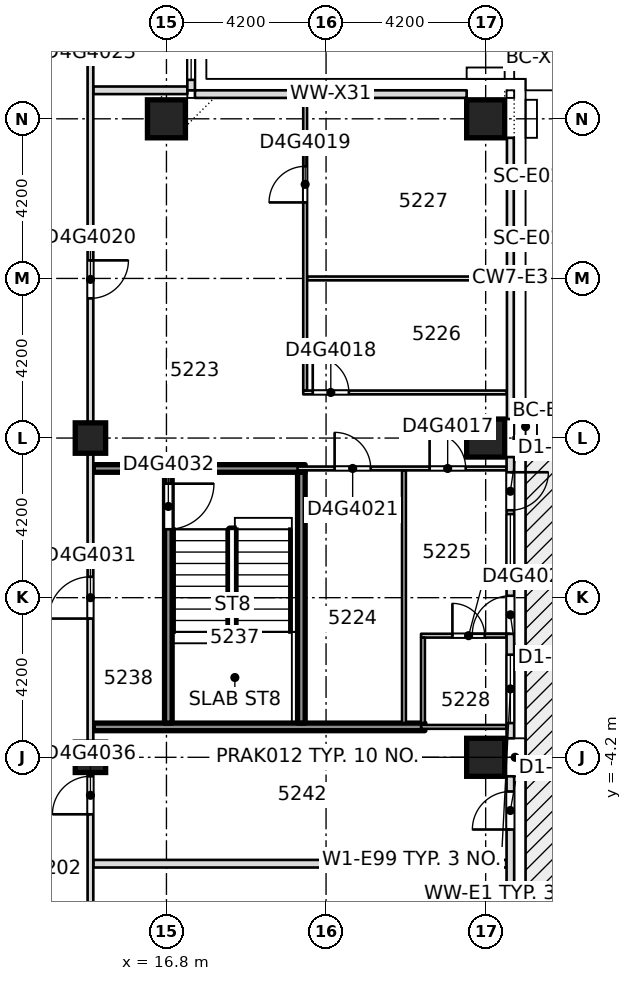
"""IFC4 building model, lengths in metres.
Left out: names, types, materials, properties, quantities, classifications, styles, units other than length and angle.
Written with IfcOpenShell. Run it as: python <this file> out.ifc"""

import sys

from ifc_helpers import new_model, si_unit, direction, frame, frame_2d, origin, origin_2d, place, context, subcontext, project, spatial, rectangle, extrude, element, fill, save


model = new_model("IFC4")
c1 = context("Model", 3, precision=1e-05, world=origin(), true_north=direction((0.0, 1.0)))
c2 = subcontext(c1, "Body", "Model", "MODEL_VIEW")
j1 = project(units=[si_unit("LENGTHUNIT", "METRE"), si_unit("PLANEANGLEUNIT", "RADIAN")], contexts=[c1])
p1 = place(None, origin())
s1 = spatial("IfcSite", under=j1, at=p1, CompositionType="ELEMENT")
p2 = place(p1, origin())
s2 = spatial("IfcBuilding", under=s1, at=p2, CompositionType="ELEMENT")
p3 = place(p2, frame((0.0, 0.0, 199.7)))
s3 = spatial("IfcBuildingStorey", under=s2, at=p3, CompositionType="ELEMENT", Elevation=199.7)
for number, where, z_axis, x_axis in (
    (1, (25.2, -4.2, -0.4), (0.0, 0.0, 1.0), (1.0, 0.0, 0.0)),
    (2, (25.2, 4.2, -0.4), (0.0, 0.0, 1.0), (1.0, 0.0, 0.0)),
    (3, (16.8, 12.6, -0.4), (0.0, 0.0, 1.0), (1.0, 0.0, 0.0)),
    (4, (25.2, 12.6, -0.4), (0.0, 0.0, 1.0), (1.0, 0.0, 0.0)),
):
    element("IfcColumn", number, at=place(p3, frame(where, z_axis=z_axis, x_axis=x_axis)), inside=s3, PredefinedType="COLUMN", context=c2, shape_type="SweptSolid", body=[
        extrude(rectangle(XDim=1.0, YDim=1.0, at=origin_2d()), origin(), (0.0, 0.0, 1.0), 3.45),
    ])
for number, where, z_axis, x_axis in (
    (5, (14.8, -4.2, -0.4), (0.0, 0.0, 1.0), (1.0, 0.0, 0.0)),
    (6, (14.8, 4.2, -0.4), (0.0, 0.0, 1.0), (1.0, 0.0, 0.0)),
):
    element("IfcColumn", number, at=place(p3, frame(where, z_axis=z_axis, x_axis=x_axis)), inside=s3, PredefinedType="COLUMN", context=c2, shape_type="SweptSolid", body=[
        extrude(rectangle(XDim=0.8, YDim=0.8, at=origin_2d()), origin(), (0.0, 0.0, 1.0), 3.45),
    ])
p4 = place(p3, frame((14.875, -7.0, 0.0), z_axis=(0.0, 0.0, 1.0), x_axis=(1.0, 0.0, 0.0)))
e7 = element("IfcWall", 7, at=p4, inside=s3, PredefinedType="PARTITIONING", context=c2, shape_type="SweptSolid", body=[
    extrude(rectangle(XDim=10.875, YDim=0.2, at=frame_2d((5.438, 0.0))), origin(), (0.0, 0.0, 1.0), 3.05),
])
p5 = place(p3, frame((14.875, -3.4, 0.0), z_axis=(0.0, 0.0, 1.0), x_axis=(1.0, 0.0, 0.0)))
e8 = element("IfcWall", 8, at=p5, inside=s3, PredefinedType="SOLIDWALL", context=c2, shape_type="SweptSolid", body=[
    extrude(rectangle(XDim=8.725, YDim=0.2, at=frame_2d((4.363, 0.0))), origin(), (0.0, 0.0, 1.0), 3.05),
])
p6 = place(p3, frame((23.5, -3.4, 0.0), z_axis=(0.0, 0.0, 1.0), x_axis=(1.0, 0.0, 0.0)))
e9 = element("IfcWall", 9, at=p6, inside=s3, PredefinedType="PARTITIONING", context=c2, shape_type="SweptSolid", body=[
    extrude(rectangle(XDim=2.25, YDim=0.1, at=frame_2d((1.125, 0.0))), origin(), (0.0, 0.0, 1.0), 3.05),
])
p7 = place(p3, frame((23.5, -1.0, 0.0), z_axis=(0.0, 0.0, 1.0), x_axis=(1.0, 0.0, 0.0)))
e10 = element("IfcWall", 10, at=p7, inside=s3, PredefinedType="PARTITIONING", context=c2, shape_type="SweptSolid", body=[
    extrude(rectangle(XDim=2.25, YDim=0.1, at=frame_2d((1.125, 0.0))), origin(), (0.0, 0.0, 1.0), 3.05),
])
p8 = place(p7, frame((0.825, 0.0, 0.0)))
e11 = element("IfcOpeningElement", 11, at=p8, cuts=e10, PredefinedType="OPENING", context=c2, shape_type="SweptSolid", body=[
    extrude(rectangle(XDim=0.85, YDim=2.1, at=frame_2d((0.425, 1.05))), frame((0.0, 0.06, 0.0), z_axis=(0.0, -1.0, 0.0), x_axis=(1.0, 0.0, 0.0)), (0.0, 0.0, 1.0), 0.12),
])
p9 = place(p3, frame((14.875, 3.4, 0.0), z_axis=(0.0, 0.0, 1.0), x_axis=(1.0, 0.0, 0.0)))
e12 = element("IfcWall", 12, at=p9, inside=s3, PredefinedType="SOLIDWALL", context=c2, shape_type="SweptSolid", body=[
    extrude(rectangle(XDim=5.575, YDim=0.2, at=frame_2d((2.788, 0.0))), origin(), (0.0, 0.0, 1.0), 3.05),
])
p10 = place(p3, frame((20.25, 3.4, 0.0), z_axis=(0.0, 0.0, 1.0), x_axis=(1.0, 0.0, 0.0)))
e13 = element("IfcWall", 13, at=p10, inside=s3, PredefinedType="PARTITIONING", context=c2, shape_type="SweptSolid", body=[
    extrude(rectangle(XDim=5.5, YDim=0.1, at=frame_2d((2.75, 0.0))), origin(), (0.0, 0.0, 1.0), 3.05),
])
p11 = place(p10, frame((3.475, 0.0, 0.0)))
e14 = element("IfcOpeningElement", 14, at=p11, cuts=e13, PredefinedType="OPENING", context=c2, shape_type="SweptSolid", body=[
    extrude(rectangle(XDim=0.95, YDim=2.1, at=frame_2d((0.475, 1.05))), frame((0.0, 0.06, 0.0), z_axis=(0.0, -1.0, 0.0), x_axis=(1.0, 0.0, 0.0)), (0.0, 0.0, 1.0), 0.12),
])
p12 = place(p10, frame((0.975, 0.0, 0.0)))
e15 = element("IfcOpeningElement", 15, at=p12, cuts=e13, PredefinedType="OPENING", context=c2, shape_type="SweptSolid", body=[
    extrude(rectangle(XDim=0.95, YDim=2.1, at=frame_2d((0.475, 1.05))), frame((0.0, 0.06, 0.0), z_axis=(0.0, -1.0, 0.0), x_axis=(1.0, 0.0, 0.0)), (0.0, 0.0, 1.0), 0.12),
])
p13 = place(p3, frame((20.4, 5.4, 0.0), z_axis=(0.0, 0.0, 1.0), x_axis=(1.0, 0.0, 0.0)))
e16 = element("IfcWall", 16, at=p13, inside=s3, PredefinedType="PARTITIONING", context=c2, shape_type="SweptSolid", body=[
    extrude(rectangle(XDim=5.35, YDim=0.1, at=frame_2d((2.675, 0.0))), origin(), (0.0, 0.0, 1.0), 3.05),
])
p14 = place(p13, frame((0.25, 0.0, 0.0)))
e17 = element("IfcOpeningElement", 17, at=p14, cuts=e16, PredefinedType="OPENING", context=c2, shape_type="SweptSolid", body=[
    extrude(rectangle(XDim=0.95, YDim=2.1, at=frame_2d((0.475, 1.05))), frame((0.0, 0.06, 0.0), z_axis=(0.0, -1.0, 0.0), x_axis=(1.0, 0.0, 0.0)), (0.0, 0.0, 1.0), 0.12),
])
p15 = place(p3, frame((20.5, 8.4, 0.0), z_axis=(0.0, 0.0, 1.0), x_axis=(1.0, 0.0, 0.0)))
e18 = element("IfcWall", 18, at=p15, inside=s3, PredefinedType="PARTITIONING", context=c2, shape_type="SweptSolid", body=[
    extrude(rectangle(XDim=5.25, YDim=0.1, at=frame_2d((2.625, 0.0))), origin(), (0.0, 0.0, 1.0), 3.05),
])
p16 = place(p3, frame((14.875, 13.35, 0.0), z_axis=(0.0, 0.0, 1.0), x_axis=(1.0, 0.0, 0.0)))
e19 = element("IfcWall", 19, at=p16, inside=s3, PredefinedType="PARTITIONING", context=c2, shape_type="SweptSolid", body=[
    extrude(rectangle(XDim=2.475, YDim=0.2, at=frame_2d((1.238, 0.0))), origin(), (0.0, 0.0, 1.0), 3.05),
])
p17 = place(p3, frame((14.8, -9.85, 0.0), z_axis=(0.0, 0.0, 1.0), x_axis=(0.0, 1.0, 0.0)))
e20 = element("IfcWall", 20, at=p17, inside=s3, PredefinedType="PARTITIONING", context=c2, shape_type="SweptSolid", body=[
    extrude(rectangle(XDim=31.4, YDim=0.15, at=frame_2d((15.7, 0.0))), origin(), (0.0, 0.0, 1.0), 3.05),
])
p18 = place(p17, frame((0.3, 0.0, 0.0)))
e21 = element("IfcOpeningElement", 21, at=p18, cuts=e20, PredefinedType="OPENING", context=c2, shape_type="SweptSolid", body=[
    extrude(rectangle(XDim=0.95, YDim=2.1, at=frame_2d((0.475, 1.05))), frame((0.0, 0.085, 0.0), z_axis=(0.0, -1.0, 0.0), x_axis=(1.0, 0.0, 0.0)), (0.0, 0.0, 1.0), 0.17),
])
p19 = place(p17, frame((17.725, 0.0, 0.0)))
e22 = element("IfcOpeningElement", 22, at=p19, cuts=e20, PredefinedType="OPENING", context=c2, shape_type="SweptSolid", body=[
    extrude(rectangle(XDim=1.0, YDim=2.1, at=frame_2d((0.5, 1.05))), frame((0.0, 0.085, 0.0), z_axis=(0.0, -1.0, 0.0), x_axis=(1.0, 0.0, 0.0)), (0.0, 0.0, 1.0), 0.17),
])
p20 = place(p17, frame((24.8, 0.0, 0.0)))
e23 = element("IfcOpeningElement", 23, at=p20, cuts=e20, PredefinedType="OPENING", context=c2, shape_type="SweptSolid", body=[
    extrude(rectangle(XDim=0.95, YDim=2.1, at=frame_2d((0.475, 1.05))), frame((0.0, 0.085, 0.0), z_axis=(0.0, -1.0, 0.0), x_axis=(1.0, 0.0, 0.0)), (0.0, 0.0, 1.0), 0.17),
])
p21 = place(p17, frame((28.7, 0.0, 0.0)))
e24 = element("IfcOpeningElement", 24, at=p21, cuts=e20, PredefinedType="OPENING", context=c2, shape_type="SweptSolid", body=[
    extrude(rectangle(XDim=0.95, YDim=2.1, at=frame_2d((0.475, 1.05))), frame((0.0, 0.085, 0.0), z_axis=(0.0, -1.0, 0.0), x_axis=(1.0, 0.0, 0.0)), (0.0, 0.0, 1.0), 0.17),
])
p22 = place(p17, frame((9.3, 0.0, 0.0)))
e25 = element("IfcOpeningElement", 25, at=p22, cuts=e20, PredefinedType="OPENING", context=c2, shape_type="SweptSolid", body=[
    extrude(rectangle(XDim=1.1, YDim=2.1, at=frame_2d((0.55, 1.05))), frame((0.0, 0.085, 0.0), z_axis=(0.0, -1.0, 0.0), x_axis=(1.0, 0.0, 0.0)), (0.0, 0.0, 1.0), 0.17),
])
p23 = place(p17, frame((4.15, 0.0, 0.0)))
e26 = element("IfcOpeningElement", 26, at=p23, cuts=e20, PredefinedType="OPENING", context=c2, shape_type="SweptSolid", body=[
    extrude(rectangle(XDim=1.0, YDim=2.1, at=frame_2d((0.5, 1.05))), frame((0.0, 0.085, 0.0), z_axis=(0.0, -1.0, 0.0), x_axis=(1.0, 0.0, 0.0)), (0.0, 0.0, 1.0), 0.17),
])
p24 = place(p3, frame((16.85, -3.3, 0.0), z_axis=(0.0, 0.0, 1.0), x_axis=(0.0, 1.0, 0.0)))
e27 = element("IfcWall", 27, at=p24, inside=s3, PredefinedType="SOLIDWALL", context=c2, shape_type="SweptSolid", body=[
    extrude(rectangle(XDim=6.6, YDim=0.2, at=frame_2d((3.3, 0.0))), origin(), (0.0, 0.0, 1.0), 3.05),
])
p25 = place(p24, frame((5.1, 0.0, 0.0)))
e28 = element("IfcOpeningElement", 28, at=p25, cuts=e27, PredefinedType="OPENING", context=c2, shape_type="SweptSolid", body=[
    extrude(rectangle(XDim=1.2, YDim=2.1, at=frame_2d((0.6, 1.05))), frame((0.0, 0.11, 0.0), z_axis=(0.0, -1.0, 0.0), x_axis=(1.0, 0.0, 0.0)), (0.0, 0.0, 1.0), 0.22),
])
p26 = place(p3, frame((20.45, 5.45, 0.0), z_axis=(0.0, 0.0, 1.0), x_axis=(0.0, 1.0, 0.0)))
e29 = element("IfcWall", 29, at=p26, inside=s3, PredefinedType="PARTITIONING", context=c2, shape_type="SweptSolid", body=[
    extrude(rectangle(XDim=7.7, YDim=0.1, at=frame_2d((3.85, 0.0))), origin(), (0.0, 0.0, 1.0), 3.05),
])
p27 = place(p26, frame((4.95, 0.0, 0.0)))
e30 = element("IfcOpeningElement", 30, at=p27, cuts=e29, PredefinedType="OPENING", context=c2, shape_type="SweptSolid", body=[
    extrude(rectangle(XDim=0.95, YDim=2.1, at=frame_2d((0.475, 1.05))), frame((0.0, 0.06, 0.0), z_axis=(0.0, -1.0, 0.0), x_axis=(1.0, 0.0, 0.0)), (0.0, 0.0, 1.0), 0.12),
])
p28 = place(p3, frame((23.05, -3.3, 0.0), z_axis=(0.0, 0.0, 1.0), x_axis=(0.0, 1.0, 0.0)))
e31 = element("IfcWall", 31, at=p28, inside=s3, PredefinedType="PARTITIONING", context=c2, shape_type="SweptSolid", body=[
    extrude(rectangle(XDim=6.65, YDim=0.1, at=frame_2d((3.325, 0.0))), origin(), (0.0, 0.0, 1.0), 3.05),
])
p29 = place(p3, frame((23.55, -3.3, 0.0), z_axis=(0.0, 0.0, 1.0), x_axis=(0.0, 1.0, 0.0)))
e32 = element("IfcWall", 32, at=p29, inside=s3, PredefinedType="PARTITIONING", context=c2, shape_type="SweptSolid", body=[
    extrude(rectangle(XDim=2.25, YDim=0.1, at=frame_2d((1.125, 0.0))), origin(), (0.0, 0.0, 1.0), 3.05),
])
p30 = place(p3, frame((25.85, -12.1, 0.0), z_axis=(0.0, 0.0, 1.0), x_axis=(0.0, 1.0, 0.0)))
e33 = element("IfcWall", 33, at=p30, inside=s3, PredefinedType="STANDARD", context=c2, shape_type="SweptSolid", body=[
    extrude(rectangle(XDim=7.4, YDim=0.2, at=frame_2d((3.7, 0.0))), origin(), (0.0, 0.0, 1.0), 3.05),
])
p31 = place(p30, frame((0.4, 0.0, 0.2)))
e34 = element("IfcOpeningElement", 34, at=p31, cuts=e33, PredefinedType="OPENING", context=c2, shape_type="SweptSolid", body=[
    extrude(rectangle(XDim=1.8, YDim=2.65, at=frame_2d((0.9, 1.325))), frame((0.0, 0.11, 0.0), z_axis=(0.0, -1.0, 0.0), x_axis=(1.0, 0.0, 0.0)), (0.0, 0.0, 1.0), 0.22),
])
p32 = place(p30, frame((2.3, 0.0, 0.0)))
e35 = element("IfcOpeningElement", 35, at=p32, cuts=e33, PredefinedType="OPENING", context=c2, shape_type="SweptSolid", body=[
    extrude(rectangle(XDim=1.0, YDim=2.4, at=frame_2d((0.5, 1.2))), frame((0.0, 0.11, 0.0), z_axis=(0.0, -1.0, 0.0), x_axis=(1.0, 0.0, 0.0)), (0.0, 0.0, 1.0), 0.22),
])
p33 = place(p30, frame((6.0, 0.0, 0.0)))
e36 = element("IfcOpeningElement", 36, at=p33, cuts=e33, PredefinedType="OPENING", context=c2, shape_type="SweptSolid", body=[
    extrude(rectangle(XDim=1.0, YDim=2.4, at=frame_2d((0.5, 1.2))), frame((0.0, 0.11, 0.0), z_axis=(0.0, -1.0, 0.0), x_axis=(1.0, 0.0, 0.0)), (0.0, 0.0, 1.0), 0.22),
])
p34 = place(p3, frame((25.85, -3.7, 0.0), z_axis=(0.0, 0.0, 1.0), x_axis=(0.0, 1.0, 0.0)))
e37 = element("IfcWall", 37, at=p34, inside=s3, PredefinedType="STANDARD", context=c2, shape_type="SweptSolid", body=[
    extrude(rectangle(XDim=7.4, YDim=0.2, at=frame_2d((3.7, 0.0))), origin(), (0.0, 0.0, 1.0), 3.05),
])
p35 = place(p34, frame((0.4, 0.0, 0.2)))
e38 = element("IfcOpeningElement", 38, at=p35, cuts=e37, PredefinedType="OPENING", context=c2, shape_type="SweptSolid", body=[
    extrude(rectangle(XDim=1.8, YDim=2.65, at=frame_2d((0.9, 1.325))), frame((0.0, 0.11, 0.0), z_axis=(0.0, -1.0, 0.0), x_axis=(1.0, 0.0, 0.0)), (0.0, 0.0, 1.0), 0.22),
])
p36 = place(p34, frame((2.75, 0.0, 0.0)))
e39 = element("IfcOpeningElement", 39, at=p36, cuts=e37, PredefinedType="OPENING", context=c2, shape_type="SweptSolid", body=[
    extrude(rectangle(XDim=1.0, YDim=2.4, at=frame_2d((0.5, 1.2))), frame((0.0, 0.11, 0.0), z_axis=(0.0, -1.0, 0.0), x_axis=(1.0, 0.0, 0.0)), (0.0, 0.0, 1.0), 0.22),
])
p37 = place(p34, frame((4.1, 0.0, 0.2)))
e40 = element("IfcOpeningElement", 40, at=p37, cuts=e37, PredefinedType="OPENING", context=c2, shape_type="SweptSolid", body=[
    extrude(rectangle(XDim=1.8, YDim=2.65, at=frame_2d((0.9, 1.325))), frame((0.0, 0.11, 0.0), z_axis=(0.0, -1.0, 0.0), x_axis=(1.0, 0.0, 0.0)), (0.0, 0.0, 1.0), 0.22),
])
p38 = place(p34, frame((6.0, 0.0, 0.0)))
e41 = element("IfcOpeningElement", 41, at=p38, cuts=e37, PredefinedType="OPENING", context=c2, shape_type="SweptSolid", body=[
    extrude(rectangle(XDim=1.0, YDim=2.4, at=frame_2d((0.5, 1.2))), frame((0.0, 0.11, 0.0), z_axis=(0.0, -1.0, 0.0), x_axis=(1.0, 0.0, 0.0)), (0.0, 0.0, 1.0), 0.22),
])
p39 = place(p3, frame((24.7, 13.25, 0.0), z_axis=(0.0, 0.0, 1.0), x_axis=(-1.0, 0.0, 0.0)))
e42 = element("IfcWall", 42, at=p39, inside=s3, PredefinedType="STANDARD", context=c2, shape_type="SweptSolid", body=[
    extrude(rectangle(XDim=7.15, YDim=0.2, at=frame_2d((3.575, 0.0))), origin(), (0.0, 0.0, 1.0), 3.05),
])
p40 = place(p3, frame((17.45, 13.35, 0.0), z_axis=(0.0, 0.0, 1.0), x_axis=(0.0, 1.0, 0.0)))
e43 = element("IfcWall", 43, at=p40, inside=s3, PredefinedType="STANDARD", context=c2, shape_type="SweptSolid", body=[
    extrude(rectangle(XDim=7.15, YDim=0.2, at=frame_2d((3.575, 0.0))), origin(), (0.0, 0.0, 1.0), 3.05),
])
p41 = place(p40, frame((0.275, 0.0, 0.2)))
e44 = element("IfcOpeningElement", 44, at=p41, cuts=e43, PredefinedType="OPENING", context=c2, shape_type="SweptSolid", body=[
    extrude(rectangle(XDim=1.8, YDim=2.65, at=frame_2d((0.9, 1.325))), frame((0.0, 0.11, 0.0), z_axis=(0.0, -1.0, 0.0), x_axis=(1.0, 0.0, 0.0)), (0.0, 0.0, 1.0), 0.22),
])
p42 = place(p40, frame((4.37, 0.0, 0.2)))
e45 = element("IfcOpeningElement", 45, at=p42, cuts=e43, PredefinedType="OPENING", context=c2, shape_type="SweptSolid", body=[
    extrude(rectangle(XDim=1.8, YDim=2.65, at=frame_2d((0.9, 1.325))), frame((0.0, 0.11, 0.0), z_axis=(0.0, -1.0, 0.0), x_axis=(1.0, 0.0, 0.0)), (0.0, 0.0, 1.0), 0.22),
])
p43 = place(p3, frame((20.35, -3.3, 0.0), z_axis=(0.0, 0.0, 1.0), x_axis=(0.0, 1.0, 0.0)))
e46 = element("IfcWall", 46, at=p43, inside=s3, PredefinedType="SOLIDWALL", context=c2, shape_type="SweptSolid", body=[
    extrude(rectangle(XDim=6.6, YDim=0.2, at=frame_2d((3.3, 0.0))), origin(), (0.0, 0.0, 1.0), 3.05),
])
p44 = place(p11, origin())
e47 = element("IfcDoor", 47, at=p44, inside=s3, OperationType="SINGLE_SWING_RIGHT", PredefinedType="DOOR", context=c2, shape_type="SweptSolid", body=[
    extrude(rectangle(XDim=0.95, YDim=2.1, at=frame_2d((0.475, 1.05))), frame((0.0, 0.025, 0.0), z_axis=(0.0, -1.0, 0.0), x_axis=(1.0, 0.0, 0.0)), (0.0, 0.0, 1.0), 0.05),
])
fill(e14, e47)
p45 = place(p14, origin())
e48 = element("IfcDoor", 48, at=p45, inside=s3, OperationType="SINGLE_SWING_LEFT", PredefinedType="DOOR", context=c2, shape_type="SweptSolid", body=[
    extrude(rectangle(XDim=0.95, YDim=2.1, at=frame_2d((0.475, 1.05))), frame((0.0, 0.025, 0.0), z_axis=(0.0, -1.0, 0.0), x_axis=(1.0, 0.0, 0.0)), (0.0, 0.0, 1.0), 0.05),
])
fill(e17, e48)
p46 = place(p27, origin())
e49 = element("IfcDoor", 49, at=p46, inside=s3, OperationType="SINGLE_SWING_LEFT", PredefinedType="DOOR", context=c2, shape_type="SweptSolid", body=[
    extrude(rectangle(XDim=0.95, YDim=2.1, at=frame_2d((0.475, 1.05))), frame((0.0, 0.025, 0.0), z_axis=(0.0, -1.0, 0.0), x_axis=(1.0, 0.0, 0.0)), (0.0, 0.0, 1.0), 0.05),
])
fill(e30, e49)
p47 = place(p19, origin())
e50 = element("IfcDoor", 50, at=p47, inside=s3, OperationType="SINGLE_SWING_LEFT", PredefinedType="DOOR", context=c2, shape_type="SweptSolid", body=[
    extrude(rectangle(XDim=1.0, YDim=2.1, at=frame_2d((0.5, 1.05))), frame((0.0, 0.025, 0.0), z_axis=(0.0, -1.0, 0.0), x_axis=(1.0, 0.0, 0.0)), (0.0, 0.0, 1.0), 0.05),
])
fill(e22, e50)
p48 = place(p12, origin())
e51 = element("IfcDoor", 51, at=p48, inside=s3, OperationType="SINGLE_SWING_RIGHT", PredefinedType="DOOR", context=c2, shape_type="SweptSolid", body=[
    extrude(rectangle(XDim=0.95, YDim=2.1, at=frame_2d((0.475, 1.05))), frame((0.0, 0.025, 0.0), z_axis=(0.0, -1.0, 0.0), x_axis=(1.0, 0.0, 0.0)), (0.0, 0.0, 1.0), 0.05),
])
fill(e15, e51)
p49 = place(p8, origin())
e52 = element("IfcDoor", 52, at=p49, inside=s3, OperationType="SINGLE_SWING_RIGHT", PredefinedType="DOOR", context=c2, shape_type="SweptSolid", body=[
    extrude(rectangle(XDim=0.85, YDim=2.1, at=frame_2d((0.425, 1.05))), frame((0.0, 0.025, 0.0), z_axis=(0.0, -1.0, 0.0), x_axis=(1.0, 0.0, 0.0)), (0.0, 0.0, 1.0), 0.05),
])
fill(e11, e52)
p50 = place(p22, origin())
e53 = element("IfcDoor", 53, at=p50, inside=s3, OperationType="SINGLE_SWING_LEFT", PredefinedType="DOOR", context=c2, shape_type="SweptSolid", body=[
    extrude(rectangle(XDim=1.1, YDim=2.1, at=frame_2d((0.55, 1.05))), frame((0.0, 0.025, 0.0), z_axis=(0.0, -1.0, 0.0), x_axis=(1.0, 0.0, 0.0)), (0.0, 0.0, 1.0), 0.05),
])
fill(e25, e53)
p51 = place(p25, origin())
e54 = element("IfcDoor", 54, at=p51, inside=s3, OperationType="SINGLE_SWING_LEFT", PredefinedType="DOOR", context=c2, shape_type="SweptSolid", body=[
    extrude(rectangle(XDim=1.2, YDim=2.1, at=frame_2d((0.6, 1.05))), frame((0.0, 0.025, 0.0), z_axis=(0.0, -1.0, 0.0), x_axis=(1.0, 0.0, 0.0)), (0.0, 0.0, 1.0), 0.05),
])
fill(e28, e54)
p52 = place(p23, origin())
e55 = element("IfcDoor", 55, at=p52, inside=s3, OperationType="SINGLE_SWING_RIGHT", PredefinedType="DOOR", context=c2, shape_type="SweptSolid", body=[
    extrude(rectangle(XDim=1.0, YDim=2.1, at=frame_2d((0.5, 1.05))), frame((0.0, 0.025, 0.0), z_axis=(0.0, -1.0, 0.0), x_axis=(1.0, 0.0, 0.0)), (0.0, 0.0, 1.0), 0.05),
])
fill(e26, e55)
p53 = place(p33, origin())
e56 = element("IfcDoor", 56, at=p53, inside=s3, OperationType="SINGLE_SWING_LEFT", PredefinedType="DOOR", context=c2, shape_type="SweptSolid", body=[
    extrude(rectangle(XDim=1.0, YDim=2.4, at=frame_2d((0.5, 1.2))), frame((0.0, 0.025, 0.0), z_axis=(0.0, -1.0, 0.0), x_axis=(1.0, 0.0, 0.0)), (0.0, 0.0, 1.0), 0.05),
])
fill(e36, e56)
p54 = place(p35, origin())
e57 = element("IfcWindow", 57, at=p54, inside=s3, PartitioningType="SINGLE_PANEL", PredefinedType="WINDOW", context=c2, shape_type="SweptSolid", body=[
    extrude(rectangle(XDim=1.8, YDim=2.65, at=frame_2d((0.9, 1.325))), frame((0.0, 0.03, 0.0), z_axis=(0.0, -1.0, 0.0), x_axis=(1.0, 0.0, 0.0)), (0.0, 0.0, 1.0), 0.06),
])
fill(e38, e57)
p55 = place(p36, origin())
e58 = element("IfcDoor", 58, at=p55, inside=s3, OperationType="SINGLE_SWING_LEFT", PredefinedType="DOOR", context=c2, shape_type="SweptSolid", body=[
    extrude(rectangle(XDim=1.0, YDim=2.4, at=frame_2d((0.5, 1.2))), frame((0.0, 0.025, 0.0), z_axis=(0.0, -1.0, 0.0), x_axis=(1.0, 0.0, 0.0)), (0.0, 0.0, 1.0), 0.05),
])
fill(e39, e58)
p56 = place(p37, origin())
e59 = element("IfcWindow", 59, at=p56, inside=s3, PartitioningType="SINGLE_PANEL", PredefinedType="WINDOW", context=c2, shape_type="SweptSolid", body=[
    extrude(rectangle(XDim=1.8, YDim=2.65, at=frame_2d((0.9, 1.325))), frame((0.0, 0.03, 0.0), z_axis=(0.0, -1.0, 0.0), x_axis=(1.0, 0.0, 0.0)), (0.0, 0.0, 1.0), 0.06),
])
fill(e40, e59)
p57 = place(p38, origin())
e60 = element("IfcDoor", 60, at=p57, inside=s3, OperationType="SINGLE_SWING_LEFT", PredefinedType="DOOR", context=c2, shape_type="SweptSolid", body=[
    extrude(rectangle(XDim=1.0, YDim=2.4, at=frame_2d((0.5, 1.2))), frame((0.0, 0.025, 0.0), z_axis=(0.0, -1.0, 0.0), x_axis=(1.0, 0.0, 0.0)), (0.0, 0.0, 1.0), 0.05),
])
fill(e41, e60)
p58 = place(p41, origin())
e61 = element("IfcWindow", 61, at=p58, inside=s3, PartitioningType="SINGLE_PANEL", PredefinedType="WINDOW", context=c2, shape_type="SweptSolid", body=[
    extrude(rectangle(XDim=1.8, YDim=2.65, at=frame_2d((0.9, 1.325))), frame((0.0, 0.03, 0.0), z_axis=(0.0, -1.0, 0.0), x_axis=(1.0, 0.0, 0.0)), (0.0, 0.0, 1.0), 0.06),
])
fill(e44, e61)
save(model, sys.argv[1])
